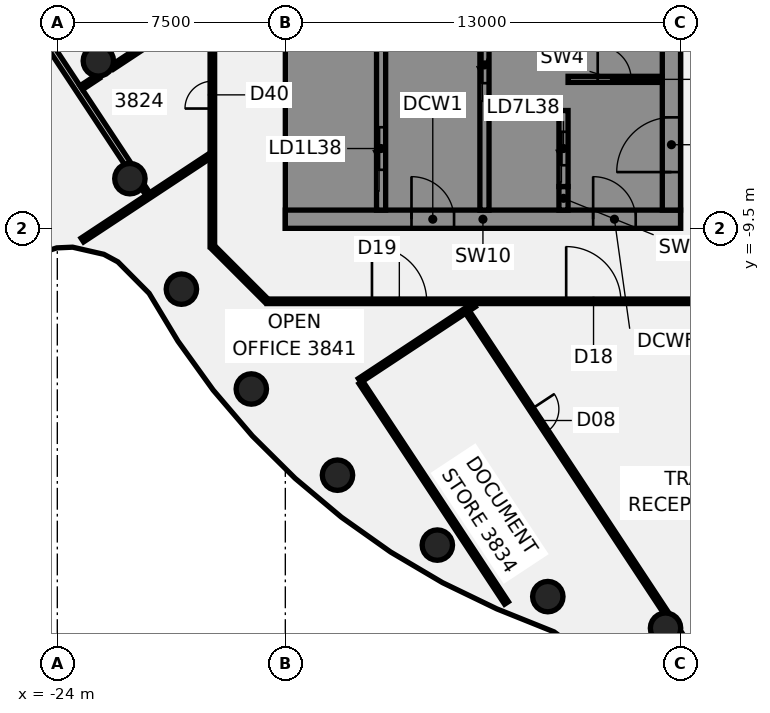
"""IFC4 building model, lengths in metres.
Left out: names, types, materials, properties, quantities, classifications, styles, units other than length and angle.
Written with IfcOpenShell. Run it as: python <this file> out.ifc"""

import sys

from ifc_helpers import new_model, si_unit, direction, frame, frame_2d, origin, origin_2d, place, context, subcontext, project, spatial, polyline, rectangle, circle, outline, extrude, element, fill, save


model = new_model("IFC4")
c1 = context("Model", 3, precision=1e-05, world=origin(), true_north=direction((0.0, 1.0)))
c2 = subcontext(c1, "Body", "Model", "MODEL_VIEW")
j1 = project(units=[si_unit("LENGTHUNIT", "METRE"), si_unit("PLANEANGLEUNIT", "RADIAN")], contexts=[c1])
p1 = place(None, origin())
s1 = spatial("IfcSite", under=j1, at=p1, CompositionType="ELEMENT")
p2 = place(p1, origin())
s2 = spatial("IfcBuilding", under=s1, at=p2, CompositionType="ELEMENT")
p3 = place(p2, frame((0.0, 0.0, 155.5)))
s3 = spatial("IfcBuildingStorey", under=s2, at=p3, CompositionType="ELEMENT", Elevation=155.5)
for number, where, z_axis, x_axis in (
    (1, (-22.651, -3.994, -0.14), (0.0, 0.0, 1.0), (1.0, 0.0, 0.0)),
    (2, (-21.613, -7.866, -0.14), (0.0, 0.0, 1.0), (1.0, 0.0, 0.0)),
    (3, (-19.919, -11.5, -0.14), (0.0, 0.0, 1.0), (1.0, 0.0, 0.0)),
    (4, (-17.619, -14.784, -0.14), (0.0, 0.0, 1.0), (1.0, 0.0, 0.0)),
    (5, (-14.784, -17.619, -0.14), (0.0, 0.0, 1.0), (1.0, 0.0, 0.0)),
    (6, (-11.5, -19.919, -0.14), (0.0, 0.0, 1.0), (1.0, 0.0, 0.0)),
    (7, (-7.866, -21.613, -0.14), (0.0, 0.0, 1.0), (1.0, 0.0, 0.0)),
    (8, (-3.994, -22.651, -0.14), (0.0, 0.0, 1.0), (1.0, 0.0, 0.0)),
):
    element("IfcColumn", number, at=place(p3, frame(where, z_axis=z_axis, x_axis=x_axis)), inside=s3, PredefinedType="COLUMN", context=c2, shape_type="SweptSolid", body=[
        extrude(circle(Radius=0.5, at=origin_2d()), origin(), (0.0, 0.0, 1.0), 3.75),
    ])
p4 = place(p3, frame((-28.862, 3.497, 0.0), z_axis=(0.0, 0.0, 1.0), x_axis=(0.551049471112, -0.834472576174, 0.0)))
e9 = element("IfcWall", 9, at=p4, inside=s3, PredefinedType="PARTITIONING", context=c2, shape_type="SweptSolid", body=[
    extrude(rectangle(XDim=13.029, YDim=0.2, at=frame_2d((6.514, 0.0))), origin(), (0.0, 0.0, 1.0), 3.01),
])
p5 = place(p4, frame((6.099, 0.0, 0.0)))
e10 = element("IfcOpeningElement", 10, at=p5, cuts=e9, PredefinedType="OPENING", context=c2, shape_type="SweptSolid", body=[
    extrude(rectangle(XDim=1.4, YDim=2.1, at=frame_2d((0.7, 1.05))), frame((0.0, 0.11, 0.0), z_axis=(0.0, -1.0, 0.0), x_axis=(1.0, 0.0, 0.0)), (0.0, 0.0, 1.0), 0.22),
])
p6 = place(p3, frame((-21.183, -8.133, 0.0), z_axis=(0.0, 0.0, 1.0), x_axis=(0.550902449234, -0.834569644444, 0.0)))
e11 = element("IfcWall", 11, at=p6, inside=s3, PredefinedType="PARTITIONING", context=c2, shape_type="SweptSolid", body=[
    extrude(rectangle(XDim=0.282, YDim=0.15, at=frame_2d((0.141, 0.0))), origin(), (0.0, 0.0, 1.0), 3.01),
])
p7 = place(p3, frame((-14.015, -14.567, 0.0), z_axis=(0.0, 0.0, 1.0), x_axis=(0.550974071804, -0.834522361713, 0.0)))
e12 = element("IfcWall", 12, at=p7, inside=s3, PredefinedType="PARTITIONING", context=c2, shape_type="SweptSolid", body=[
    extrude(rectangle(XDim=8.692, YDim=0.15, at=frame_2d((4.346, 0.0))), origin(), (0.0, 0.0, 1.0), 3.01),
])
p8 = place(p3, frame((-10.507, -12.257, 0.0), z_axis=(0.0, 0.0, 1.0), x_axis=(0.550961906762, -0.834530393274, 0.0)))
e13 = element("IfcWall", 13, at=p8, inside=s3, PredefinedType="PARTITIONING", context=c2, shape_type="SweptSolid", body=[
    extrude(rectangle(XDim=11.848, YDim=0.15, at=frame_2d((5.924, 0.0))), origin(), (0.0, 0.0, 1.0), 3.01),
])
p9 = place(p8, frame((3.82, 0.0, 0.0)))
e14 = element("IfcOpeningElement", 14, at=p9, cuts=e13, PredefinedType="OPENING", context=c2, shape_type="SweptSolid", body=[
    extrude(rectangle(XDim=0.9, YDim=2.1, at=frame_2d((0.45, 1.05))), frame((0.0, 0.085, 0.0), z_axis=(0.0, -1.0, 0.0), x_axis=(1.0, 0.0, 0.0)), (0.0, 0.0, 1.0), 0.17),
])
p10 = place(p3, frame((-3.53, -22.824, 0.0), z_axis=(0.0, 0.0, 1.0), x_axis=(0.550978058152, -0.834519729805, 0.0)))
e15 = element("IfcWall", 15, at=p10, inside=s3, PredefinedType="PARTITIONING", context=c2, shape_type="SweptSolid", body=[
    extrude(rectangle(XDim=4.957, YDim=0.15, at=frame_2d((2.479, 0.0))), origin(), (0.0, 0.0, 1.0), 3.01),
])
p11 = place(p3, frame((-18.872, -10.128, 0.0), z_axis=(0.0, 0.0, 1.0), x_axis=(0.707106781187, -0.707106781187, 0.0)))
e16 = element("IfcWall", 16, at=p11, inside=s3, PredefinedType="PARTITIONING", context=c2, shape_type="SweptSolid", body=[
    extrude(rectangle(XDim=2.465, YDim=0.15, at=frame_2d((1.232, 0.0))), origin(), (0.0, 0.0, 1.0), 3.01),
])
p12 = place(p3, frame((-17.1, -11.9, 0.0), z_axis=(0.0, 0.0, 1.0), x_axis=(1.0, 0.0, 0.0)))
e17 = element("IfcWall", 17, at=p12, inside=s3, PredefinedType="PARTITIONING", context=c2, shape_type="SweptSolid", body=[
    extrude(rectangle(XDim=34.165, YDim=0.15, at=frame_2d((17.083, 0.0))), origin(), (0.0, 0.0, 1.0), 3.01),
])
p13 = place(p12, frame((9.838, 0.0, 0.0)))
e18 = element("IfcOpeningElement", 18, at=p13, cuts=e17, PredefinedType="OPENING", context=c2, shape_type="SweptSolid", body=[
    extrude(rectangle(XDim=1.8, YDim=2.1, at=frame_2d((0.9, 1.05))), frame((0.0, 0.085, 0.0), z_axis=(0.0, -1.0, 0.0), x_axis=(1.0, 0.0, 0.0)), (0.0, 0.0, 1.0), 0.17),
])
p14 = place(p12, frame((3.45, 0.0, 0.0)))
e19 = element("IfcOpeningElement", 19, at=p14, cuts=e17, PredefinedType="OPENING", context=c2, shape_type="SweptSolid", body=[
    extrude(rectangle(XDim=1.8, YDim=2.1, at=frame_2d((0.9, 1.05))), frame((0.0, 0.085, 0.0), z_axis=(0.0, -1.0, 0.0), x_axis=(1.0, 0.0, 0.0)), (0.0, 0.0, 1.0), 0.17),
])
p15 = place(p12, frame((23.889, 0.0, 0.0)))
e20 = element("IfcOpeningElement", 20, at=p15, cuts=e17, PredefinedType="OPENING", context=c2, shape_type="SweptSolid", body=[
    extrude(rectangle(XDim=1.8, YDim=2.1, at=frame_2d((0.9, 1.05))), frame((0.0, 0.085, 0.0), z_axis=(0.0, -1.0, 0.0), x_axis=(1.0, 0.0, 0.0)), (0.0, 0.0, 1.0), 0.17),
])
p16 = place(p3, frame((-23.21, -4.873, 0.0), z_axis=(0.0, 0.0, 1.0), x_axis=(0.834729938558, 0.550659540619, 0.0)))
e21 = element("IfcWall", 21, at=p16, inside=s3, PredefinedType="PARTITIONING", context=c2, shape_type="SweptSolid", body=[
    extrude(rectangle(XDim=0.67, YDim=0.15, at=frame_2d((0.335, 0.0))), origin(), (0.0, 0.0, 1.0), 3.01),
])
p17 = place(p3, frame((-22.197, -4.204, 0.0), z_axis=(0.0, 0.0, 1.0), x_axis=(0.834493361806, 0.551017993446, 0.0)))
e22 = element("IfcWall", 22, at=p17, inside=s3, PredefinedType="PARTITIONING", context=c2, shape_type="SweptSolid", body=[
    extrude(rectangle(XDim=3.831, YDim=0.15, at=frame_2d((1.916, 0.0))), origin(), (0.0, 0.0, 1.0), 3.01),
])
p18 = place(p3, frame((-23.177, -9.884, 0.0), z_axis=(0.0, 0.0, 1.0), x_axis=(0.834495924201, 0.551014112788, 0.0)))
e23 = element("IfcWall", 23, at=p18, inside=s3, PredefinedType="PARTITIONING", context=c2, shape_type="SweptSolid", body=[
    extrude(rectangle(XDim=5.005, YDim=0.15, at=frame_2d((2.503, 0.0))), origin(), (0.0, 0.0, 1.0), 3.01),
])
p19 = place(p3, frame((-14.056, -14.504, 0.0), z_axis=(0.0, 0.0, 1.0), x_axis=(0.834539732237, 0.550947760971, 0.0)))
e24 = element("IfcWall", 24, at=p19, inside=s3, PredefinedType="PARTITIONING", context=c2, shape_type="SweptSolid", body=[
    extrude(rectangle(XDim=4.511, YDim=0.15, at=frame_2d((2.255, 0.0))), origin(), (0.0, 0.0, 1.0), 3.01),
])
p20 = place(p3, frame((-3.497, -28.862, 0.0), z_axis=(0.0, 0.0, 1.0), x_axis=(0.834472576174, 0.551049471112, 0.0)))
e25 = element("IfcWall", 25, at=p20, inside=s3, PredefinedType="PARTITIONING", context=c2, shape_type="SweptSolid", body=[
    extrude(rectangle(XDim=13.029, YDim=0.2, at=frame_2d((6.514, 0.0))), origin(), (0.0, 0.0, 1.0), 3.01),
])
p21 = place(p20, frame((5.799, 0.0, 0.0)))
e26 = element("IfcOpeningElement", 26, at=p21, cuts=e25, PredefinedType="OPENING", context=c2, shape_type="SweptSolid", body=[
    extrude(rectangle(XDim=1.4, YDim=2.1, at=frame_2d((0.7, 1.05))), frame((0.0, 0.11, 0.0), z_axis=(0.0, -1.0, 0.0), x_axis=(1.0, 0.0, 0.0)), (0.0, 0.0, 1.0), 0.22),
])
p22 = place(p3, frame((-18.9, -10.1, 0.0), z_axis=(0.0, 0.0, 1.0), x_axis=(0.0, 1.0, 0.0)))
e27 = element("IfcWall", 27, at=p22, inside=s3, PredefinedType="PARTITIONING", context=c2, shape_type="SweptSolid", body=[
    extrude(rectangle(XDim=20.2, YDim=0.15, at=frame_2d((10.1, 0.0))), origin(), (0.0, 0.0, 1.0), 3.01),
])
p23 = place(p22, frame((12.273, 0.0, 0.0)))
e28 = element("IfcOpeningElement", 28, at=p23, cuts=e27, PredefinedType="OPENING", context=c2, shape_type="SweptSolid", body=[
    extrude(rectangle(XDim=1.8, YDim=2.1, at=frame_2d((0.9, 1.05))), frame((0.0, 0.085, 0.0), z_axis=(0.0, -1.0, 0.0), x_axis=(1.0, 0.0, 0.0)), (0.0, 0.0, 1.0), 0.17),
])
p24 = place(p22, frame((4.54, 0.0, 0.0)))
e29 = element("IfcOpeningElement", 29, at=p24, cuts=e27, PredefinedType="OPENING", context=c2, shape_type="SweptSolid", body=[
    extrude(rectangle(XDim=0.9, YDim=2.1, at=frame_2d((0.45, 1.05))), frame((0.0, 0.085, 0.0), z_axis=(0.0, -1.0, 0.0), x_axis=(1.0, 0.0, 0.0)), (0.0, 0.0, 1.0), 0.17),
])
p25 = place(p3, frame((-16.5, -9.2, 0.0), z_axis=(0.0, 0.0, 1.0), x_axis=(1.0, 0.0, 0.0)))
e30 = element("IfcWall", 30, at=p25, inside=s3, PredefinedType="SHEAR", context=c2, shape_type="SweptSolid", body=[
    extrude(rectangle(XDim=13.0, YDim=0.6, at=frame_2d((6.5, 0.0))), origin(), (0.0, 0.0, 1.0), 3.61),
])
p26 = place(p25, frame((4.15, 0.0, 0.0)))
e31 = element("IfcOpeningElement", 31, at=p26, cuts=e30, PredefinedType="OPENING", context=c2, shape_type="SweptSolid", body=[
    extrude(rectangle(XDim=1.4, YDim=2.1, at=frame_2d((0.7, 1.05))), frame((0.0, 0.31, 0.0), z_axis=(0.0, -1.0, 0.0), x_axis=(1.0, 0.0, 0.0)), (0.0, 0.0, 1.0), 0.62),
])
p27 = place(p25, frame((10.125, 0.0, 0.0)))
e32 = element("IfcOpeningElement", 32, at=p27, cuts=e30, PredefinedType="OPENING", context=c2, shape_type="SweptSolid", body=[
    extrude(rectangle(XDim=1.4, YDim=2.1, at=frame_2d((0.7, 1.05))), frame((0.0, 0.31, 0.0), z_axis=(0.0, -1.0, 0.0), x_axis=(1.0, 0.0, 0.0)), (0.0, 0.0, 1.0), 0.62),
])
p28 = place(p3, origin())
e33 = element("IfcWall", 33, at=p28, inside=s3, PredefinedType="SHEAR", context=c2, shape_type="SweptSolid", body=[
    extrude(outline(polyline([(-13.5, -8.125), (-15.9, -8.125), (-15.9, -5.625), (-13.5, -5.625), (-13.5, -5.375), (-15.9, -5.375), (-15.9, 5.375), (-13.5, 5.375), (-13.5, 5.625), (-15.9, 5.625), (-15.9, 8.125), (-13.5, 8.125), (-13.5, 8.9), (-15.9, 8.9), (-16.5, 8.9), (-16.5, -8.9), (-15.9, -8.9), (-13.5, -8.9), (-13.5, -8.125)])), origin(), (0.0, 0.0, 1.0), 3.61),
])
p29 = place(p3, origin())
e34 = element("IfcWall", 34, at=p29, inside=s3, PredefinedType="SHEAR", context=c2, shape_type="SweptSolid", body=[
    extrude(outline(polyline([(-9.8, -5.375), (-9.8, -5.625), (-7.5, -5.625), (-7.2, -5.625), (-7.2, 8.9), (-7.5, 8.9), (-9.8, 8.9), (-9.8, 8.125), (-7.5, 8.125), (-7.5, 5.625), (-9.8, 5.625), (-9.8, 5.375), (-7.5, 5.375), (-7.5, 2.875), (-9.8, 2.875), (-9.8, 2.625), (-7.5, 2.625), (-7.5, 0.125), (-9.8, 0.125), (-9.8, -0.125), (-7.5, -0.125), (-7.5, -2.625), (-9.8, -2.625), (-9.8, -2.875), (-7.5, -2.875), (-7.5, -5.375), (-9.8, -5.375)])), origin(), (0.0, 0.0, 1.0), 3.61),
])
p30 = place(p3, origin())
e35 = element("IfcWall", 35, at=p30, inside=s3, PredefinedType="SHEAR", context=c2, shape_type="SweptSolid", body=[
    extrude(outline(polyline([(-7.5, -8.125), (-9.55, -8.125), (-9.55, -5.625), (-9.8, -5.625), (-9.8, -8.125), (-9.8, -8.9), (-7.5, -8.9), (-7.5, -8.125)])), origin(), (0.0, 0.0, 1.0), 3.61),
])
p31 = place(p3, frame((-7.35, -8.9, 0.0), z_axis=(0.0, 0.0, 1.0), x_axis=(0.0, 1.0, 0.0)))
e36 = element("IfcWall", 36, at=p31, inside=s3, PredefinedType="SHEAR", context=c2, shape_type="SweptSolid", body=[
    extrude(rectangle(XDim=0.775, YDim=0.3, at=frame_2d((0.387, 0.0))), origin(), (0.0, 0.0, 1.0), 3.61),
])
p32 = place(p3, frame((-13.35, -8.9, 0.0), z_axis=(0.0, 0.0, 1.0), x_axis=(0.0, 1.0, 0.0)))
e37 = element("IfcWall", 37, at=p32, inside=s3, PredefinedType="SHEAR", context=c2, shape_type="SweptSolid", body=[
    extrude(rectangle(XDim=17.8, YDim=0.3, at=frame_2d((8.9, 0.0))), origin(), (0.0, 0.0, 1.0), 3.61),
])
p33 = place(p32, frame((1.325, 0.0, 0.0)))
e38 = element("IfcOpeningElement", 38, at=p33, cuts=e37, PredefinedType="OPENING", context=c2, shape_type="SweptSolid", body=[
    extrude(rectangle(XDim=1.4, YDim=2.1, at=frame_2d((0.7, 1.05))), frame((0.0, 0.16, 0.0), z_axis=(0.0, -1.0, 0.0), x_axis=(1.0, 0.0, 0.0)), (0.0, 0.0, 1.0), 0.32),
])
p34 = place(p32, frame((6.546, 0.0, 0.0)))
e39 = element("IfcOpeningElement", 39, at=p34, cuts=e37, PredefinedType="OPENING", context=c2, shape_type="SweptSolid", body=[
    extrude(rectangle(XDim=1.0, YDim=2.1, at=frame_2d((0.5, 1.05))), frame((0.0, 0.16, 0.0), z_axis=(0.0, -1.0, 0.0), x_axis=(1.0, 0.0, 0.0)), (0.0, 0.0, 1.0), 0.32),
])
p35 = place(p32, frame((12.046, 0.0, 0.0)))
e40 = element("IfcOpeningElement", 40, at=p35, cuts=e37, PredefinedType="OPENING", context=c2, shape_type="SweptSolid", body=[
    extrude(rectangle(XDim=1.0, YDim=2.1, at=frame_2d((0.5, 1.05))), frame((0.0, 0.16, 0.0), z_axis=(0.0, -1.0, 0.0), x_axis=(1.0, 0.0, 0.0)), (0.0, 0.0, 1.0), 0.32),
])
p36 = place(p3, frame((-9.95, -8.9, 0.0), z_axis=(0.0, 0.0, 1.0), x_axis=(0.0, 1.0, 0.0)))
e41 = element("IfcWall", 41, at=p36, inside=s3, PredefinedType="SHEAR", context=c2, shape_type="SweptSolid", body=[
    extrude(rectangle(XDim=17.8, YDim=0.3, at=frame_2d((8.9, 0.0))), origin(), (0.0, 0.0, 1.0), 3.61),
])
p37 = place(p36, frame((4.175, 0.0, 0.0)))
e42 = element("IfcOpeningElement", 42, at=p37, cuts=e41, PredefinedType="OPENING", context=c2, shape_type="SweptSolid", body=[
    extrude(rectangle(XDim=1.2, YDim=2.1, at=frame_2d((0.6, 1.05))), frame((0.0, 0.16, 0.0), z_axis=(0.0, -1.0, 0.0), x_axis=(1.0, 0.0, 0.0)), (0.0, 0.0, 1.0), 0.32),
])
p38 = place(p36, frame((6.925, 0.0, 0.0)))
e43 = element("IfcOpeningElement", 43, at=p38, cuts=e41, PredefinedType="OPENING", context=c2, shape_type="SweptSolid", body=[
    extrude(rectangle(XDim=1.2, YDim=2.1, at=frame_2d((0.6, 1.05))), frame((0.0, 0.16, 0.0), z_axis=(0.0, -1.0, 0.0), x_axis=(1.0, 0.0, 0.0)), (0.0, 0.0, 1.0), 0.32),
])
p39 = place(p3, frame((-7.35, -8.125, 0.0), z_axis=(0.0, 0.0, 1.0), x_axis=(0.0, 1.0, 0.0)))
e44 = element("IfcWall", 44, at=p39, inside=s3, PredefinedType="SHEAR", context=c2, shape_type="SweptSolid", body=[
    extrude(rectangle(XDim=2.5, YDim=0.3, at=frame_2d((1.25, 0.0))), origin(), (0.0, 0.0, 1.0), 3.61),
])
p40 = place(p39, frame((0.7, 0.0, 0.0)))
e45 = element("IfcOpeningElement", 45, at=p40, cuts=e44, PredefinedType="OPENING", context=c2, shape_type="SweptSolid", body=[
    extrude(rectangle(XDim=1.1, YDim=2.1, at=frame_2d((0.55, 1.05))), frame((0.0, 0.16, 0.0), z_axis=(0.0, -1.0, 0.0), x_axis=(1.0, 0.0, 0.0)), (0.0, 0.0, 1.0), 0.32),
])
p41 = place(p3, frame((-3.8, -8.9, 0.0), z_axis=(0.0, 0.0, 1.0), x_axis=(0.0, 1.0, 0.0)))
e46 = element("IfcWall", 46, at=p41, inside=s3, PredefinedType="SHEAR", context=c2, shape_type="SweptSolid", body=[
    extrude(rectangle(XDim=17.8, YDim=0.6, at=frame_2d((8.9, 0.0))), origin(), (0.0, 0.0, 1.0), 3.61),
])
p42 = place(p41, frame((1.25, 0.0, 0.0)))
e47 = element("IfcOpeningElement", 47, at=p42, cuts=e46, PredefinedType="OPENING", context=c2, shape_type="SweptSolid", body=[
    extrude(rectangle(XDim=1.8, YDim=2.1, at=frame_2d((0.9, 1.05))), frame((0.0, 0.31, 0.0), z_axis=(0.0, -1.0, 0.0), x_axis=(1.0, 0.0, 0.0)), (0.0, 0.0, 1.0), 0.62),
])
p43 = place(p41, frame((12.377, 0.0, 0.0)))
e48 = element("IfcOpeningElement", 48, at=p43, cuts=e46, PredefinedType="OPENING", context=c2, shape_type="SweptSolid", body=[
    extrude(rectangle(XDim=1.0, YDim=2.1, at=frame_2d((0.5, 1.05))), frame((0.0, 0.31, 0.0), z_axis=(0.0, -1.0, 0.0), x_axis=(1.0, 0.0, 0.0)), (0.0, 0.0, 1.0), 0.62),
])
p44 = place(p41, frame((15.903, 0.0, 0.0)))
e49 = element("IfcOpeningElement", 49, at=p44, cuts=e46, PredefinedType="OPENING", context=c2, shape_type="SweptSolid", body=[
    extrude(rectangle(XDim=1.0, YDim=2.1, at=frame_2d((0.5, 1.05))), frame((0.0, 0.31, 0.0), z_axis=(0.0, -1.0, 0.0), x_axis=(1.0, 0.0, 0.0)), (0.0, 0.0, 1.0), 0.62),
])
p45 = place(p3, frame((-7.2, -4.6, 0.0), z_axis=(0.0, 0.0, 1.0), x_axis=(1.0, 0.0, 0.0)))
e50 = element("IfcWall", 50, at=p45, inside=s3, PredefinedType="SHEAR", context=c2, shape_type="SweptSolid", body=[
    extrude(rectangle(XDim=3.1, YDim=0.2, at=frame_2d((1.55, 0.0))), origin(), (0.0, 0.0, 1.0), 3.61),
])
p46 = place(p45, frame((0.975, 0.0, 0.0)))
e51 = element("IfcOpeningElement", 51, at=p46, cuts=e50, PredefinedType="OPENING", context=c2, shape_type="SweptSolid", body=[
    extrude(rectangle(XDim=1.1, YDim=2.1, at=frame_2d((0.55, 1.05))), frame((0.0, 0.11, 0.0), z_axis=(0.0, -1.0, 0.0), x_axis=(1.0, 0.0, 0.0)), (0.0, 0.0, 1.0), 0.22),
])
p47 = place(p9, frame((0.9, 0.0, 0.0), z_axis=(0.0, 0.0, 1.0), x_axis=(-1.0, 0.0, 0.0)))
e52 = element("IfcDoor", 52, at=p47, inside=s3, OperationType="SINGLE_SWING_LEFT", PredefinedType="DOOR", context=c2, shape_type="SweptSolid", body=[
    extrude(rectangle(XDim=0.9, YDim=2.1, at=frame_2d((0.45, 1.05))), frame((0.0, 0.025, 0.0), z_axis=(0.0, -1.0, 0.0), x_axis=(1.0, 0.0, 0.0)), (0.0, 0.0, 1.0), 0.05),
])
fill(e14, e52)
p48 = place(p13, origin())
e53 = element("IfcDoor", 53, at=p48, inside=s3, OperationType="DOUBLE_DOOR_SINGLE_SWING", PredefinedType="DOOR", context=c2, shape_type="SweptSolid", body=[
    extrude(rectangle(XDim=1.8, YDim=2.1, at=frame_2d((0.9, 1.05))), frame((0.0, 0.025, 0.0), z_axis=(0.0, -1.0, 0.0), x_axis=(1.0, 0.0, 0.0)), (0.0, 0.0, 1.0), 0.05),
])
fill(e18, e53)
p49 = place(p14, frame((1.8, 0.0, 0.0), z_axis=(0.0, 0.0, 1.0), x_axis=(-1.0, 0.0, 0.0)))
e54 = element("IfcDoor", 54, at=p49, inside=s3, OperationType="DOUBLE_DOOR_SINGLE_SWING", PredefinedType="DOOR", context=c2, shape_type="SweptSolid", body=[
    extrude(rectangle(XDim=1.8, YDim=2.1, at=frame_2d((0.9, 1.05))), frame((0.0, 0.025, 0.0), z_axis=(0.0, -1.0, 0.0), x_axis=(1.0, 0.0, 0.0)), (0.0, 0.0, 1.0), 0.05),
])
fill(e19, e54)
p50 = place(p24, origin())
e55 = element("IfcDoor", 55, at=p50, inside=s3, OperationType="SINGLE_SWING_RIGHT", PredefinedType="DOOR", context=c2, shape_type="SweptSolid", body=[
    extrude(rectangle(XDim=0.9, YDim=2.1, at=frame_2d((0.45, 1.05))), frame((0.0, 0.025, 0.0), z_axis=(0.0, -1.0, 0.0), x_axis=(1.0, 0.0, 0.0)), (0.0, 0.0, 1.0), 0.05),
])
fill(e29, e55)
p51 = place(p26, origin())
e56 = element("IfcDoor", 56, at=p51, inside=s3, OperationType="SINGLE_SWING_LEFT", PredefinedType="DOOR", context=c2, shape_type="SweptSolid", body=[
    extrude(rectangle(XDim=1.4, YDim=2.1, at=frame_2d((0.7, 1.05))), frame((0.0, 0.025, 0.0), z_axis=(0.0, -1.0, 0.0), x_axis=(1.0, 0.0, 0.0)), (0.0, 0.0, 1.0), 0.05),
])
fill(e31, e56)
p52 = place(p27, origin())
e57 = element("IfcDoor", 57, at=p52, inside=s3, OperationType="SINGLE_SWING_LEFT", PredefinedType="DOOR", context=c2, shape_type="SweptSolid", body=[
    extrude(rectangle(XDim=1.4, YDim=2.1, at=frame_2d((0.7, 1.05))), frame((0.0, 0.025, 0.0), z_axis=(0.0, -1.0, 0.0), x_axis=(1.0, 0.0, 0.0)), (0.0, 0.0, 1.0), 0.05),
])
fill(e32, e57)
p53 = place(p42, origin())
e58 = element("IfcDoor", 58, at=p53, inside=s3, OperationType="SINGLE_SWING_LEFT", PredefinedType="DOOR", context=c2, shape_type="SweptSolid", body=[
    extrude(rectangle(XDim=1.8, YDim=2.1, at=frame_2d((0.9, 1.05))), frame((0.0, 0.025, 0.0), z_axis=(0.0, -1.0, 0.0), x_axis=(1.0, 0.0, 0.0)), (0.0, 0.0, 1.0), 0.05),
])
fill(e47, e58)
p54 = place(p46, origin())
e59 = element("IfcDoor", 59, at=p54, inside=s3, OperationType="SINGLE_SWING_LEFT", PredefinedType="DOOR", context=c2, shape_type="SweptSolid", body=[
    extrude(rectangle(XDim=1.1, YDim=2.1, at=frame_2d((0.55, 1.05))), frame((0.0, 0.025, 0.0), z_axis=(0.0, -1.0, 0.0), x_axis=(1.0, 0.0, 0.0)), (0.0, 0.0, 1.0), 0.05),
])
fill(e51, e59)
p55 = place(p33, origin())
e60 = element("IfcDoor", 60, at=p55, inside=s3, OperationType="SLIDING_TO_LEFT", PredefinedType="DOOR", context=c2, shape_type="SweptSolid", body=[
    extrude(rectangle(XDim=1.4, YDim=2.1, at=frame_2d((0.7, 1.05))), frame((0.0, 0.025, 0.0), z_axis=(0.0, -1.0, 0.0), x_axis=(1.0, 0.0, 0.0)), (0.0, 0.0, 1.0), 0.05),
])
fill(e38, e60)
p56 = place(p40, origin())
e61 = element("IfcDoor", 61, at=p56, inside=s3, OperationType="SLIDING_TO_LEFT", PredefinedType="DOOR", context=c2, shape_type="SweptSolid", body=[
    extrude(rectangle(XDim=1.1, YDim=2.1, at=frame_2d((0.55, 1.05))), frame((0.0, 0.025, 0.0), z_axis=(0.0, -1.0, 0.0), x_axis=(1.0, 0.0, 0.0)), (0.0, 0.0, 1.0), 0.05),
])
fill(e45, e61)
p57 = place(p37, origin())
e62 = element("IfcDoor", 62, at=p57, inside=s3, OperationType="SLIDING_TO_LEFT", PredefinedType="DOOR", context=c2, shape_type="SweptSolid", body=[
    extrude(rectangle(XDim=1.2, YDim=2.1, at=frame_2d((0.6, 1.05))), frame((0.0, 0.025, 0.0), z_axis=(0.0, -1.0, 0.0), x_axis=(1.0, 0.0, 0.0)), (0.0, 0.0, 1.0), 0.05),
])
fill(e42, e62)
save(model, sys.argv[1])
